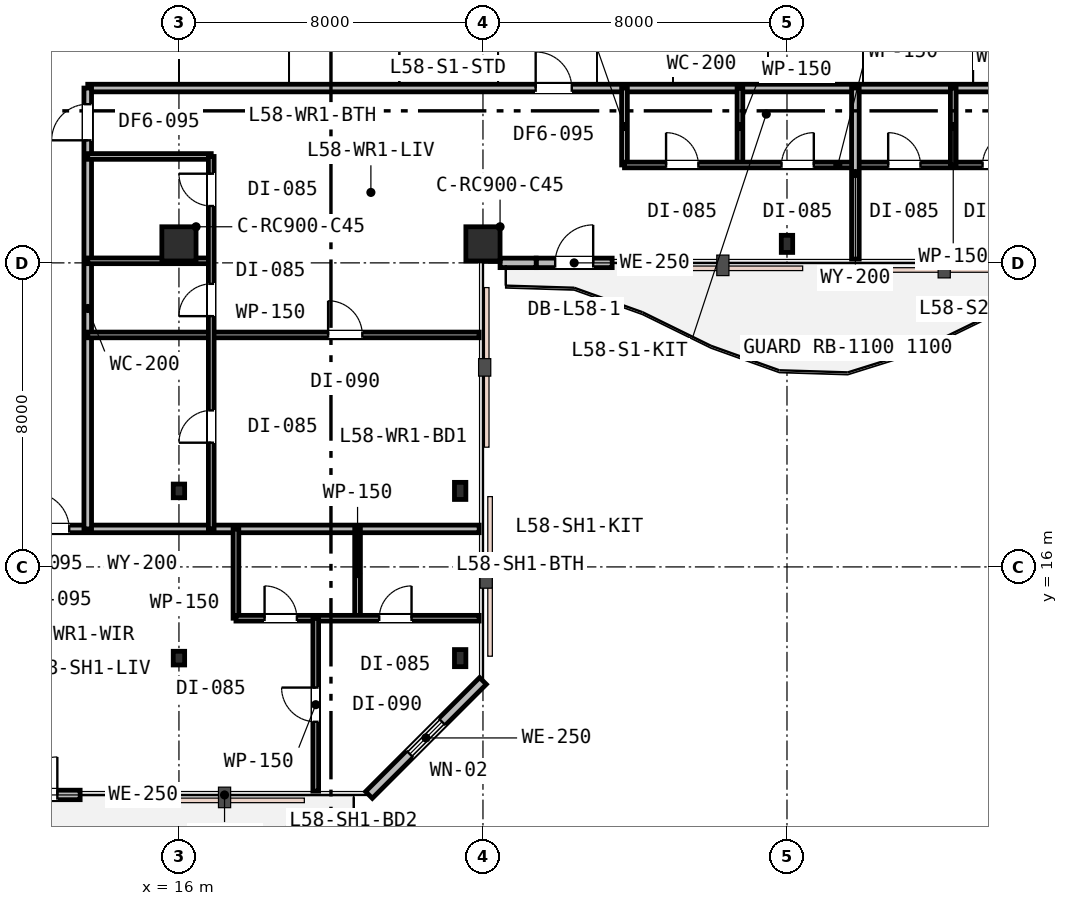
"""IFC4 building model, lengths in metres.
Left out: names, types, materials, properties, quantities, classifications, styles, units other than length and angle.
Written with IfcOpenShell. Run it as: python <this file> out.ifc"""

import sys

from ifc_helpers import new_model, si_unit, direction, frame, frame_2d, origin, origin_2d, place, context, subcontext, project, spatial, rectangle, i_section, extrude, element, fill, save


model = new_model("IFC4")
c1 = context("Model", 3, precision=1e-05, world=origin(), true_north=direction((0.0, 1.0)))
c2 = subcontext(c1, "Body", "Model", "MODEL_VIEW")
j1 = project(units=[si_unit("LENGTHUNIT", "METRE"), si_unit("PLANEANGLEUNIT", "RADIAN")], contexts=[c1])
p1 = place(None, origin())
s1 = spatial("IfcSite", under=j1, at=p1, CompositionType="ELEMENT")
p2 = place(p1, origin())
s2 = spatial("IfcBuilding", under=s1, at=p2, CompositionType="ELEMENT")
p3 = place(p2, frame((0.0, 0.0, 226.0)))
s3 = spatial("IfcBuildingStorey", under=s2, at=p3, CompositionType="ELEMENT", Elevation=226.0)
for number, where, z_axis, x_axis in (
    (1, (16.0, 24.5, 0.0), (0.0, 0.0, 1.0), (1.0, 0.0, 0.0)),
    (2, (24.0, 24.5, 0.0), (0.0, 0.0, 1.0), (1.0, 0.0, 0.0)),
):
    element("IfcColumn", number, at=place(p3, frame(where, z_axis=z_axis, x_axis=x_axis)), inside=s3, PredefinedType="COLUMN", context=c2, shape_type="SweptSolid", body=[
        extrude(rectangle(XDim=0.9, YDim=0.9, at=origin_2d()), origin(), (0.0, 0.0, 1.0), 3.8),
    ])
for number, where, z_axis, x_axis in (
    (3, (32.0, 24.5, 0.0), (0.0, 0.0, 1.0), (1.0, 0.0, 0.0)),
    (4, (23.4, 13.6, 0.0), (0.0, 0.0, 1.0), (1.0, 0.0, 0.0)),
    (5, (23.4, 18.0, 0.0), (0.0, 0.0, 1.0), (1.0, 0.0, 0.0)),
):
    element("IfcColumn", number, at=place(p3, frame(where, z_axis=z_axis, x_axis=x_axis)), inside=s3, PredefinedType="COLUMN", context=c2, shape_type="SweptSolid", body=[
        extrude(i_section(OverallWidth=0.3, OverallDepth=0.45, WebThickness=0.014, FlangeThickness=0.026, FilletRadius=0.027, at=origin_2d()), origin(), (0.0, 0.0, 1.0), 3.8),
    ])
for number, where, z_axis, x_axis in (
    (6, (16.0, 13.6, 0.0), (0.0, 0.0, 1.0), (1.0, 0.0, 0.0)),
    (7, (16.0, 18.0, 0.0), (0.0, 0.0, 1.0), (1.0, 0.0, 0.0)),
):
    element("IfcColumn", number, at=place(p3, frame(where, z_axis=z_axis, x_axis=x_axis)), inside=s3, PredefinedType="COLUMN", context=c2, shape_type="SweptSolid", body=[
        extrude(i_section(OverallWidth=0.3, OverallDepth=0.36, WebThickness=0.013, FlangeThickness=0.022, FilletRadius=0.027, at=origin_2d()), origin(), (0.0, 0.0, 1.0), 3.8),
    ])
p4 = place(p3, frame((11.2, 10.0, 0.0), z_axis=(0.0, 0.0, 1.0), x_axis=(1.0, 0.0, 0.0)))
e8 = element("IfcWall", 8, at=p4, inside=s3, PredefinedType="STANDARD", context=c2, shape_type="SweptSolid", body=[
    extrude(rectangle(XDim=2.2, YDim=0.25, at=frame_2d((1.1, 0.0))), origin(), (0.0, 0.0, 1.0), 3.53),
])
p5 = place(p4, frame((0.6, 0.0, 0.0)))
e9 = element("IfcOpeningElement", 9, at=p5, cuts=e8, PredefinedType="OPENING", context=c2, shape_type="SweptSolid", body=[
    extrude(rectangle(XDim=1.0, YDim=2.15, at=frame_2d((0.5, 1.075))), frame((0.0, 0.135, 0.0), z_axis=(0.0, -1.0, 0.0), x_axis=(1.0, 0.0, 0.0)), (0.0, 0.0, 1.0), 0.27),
])
p6 = place(p3, frame((21.0, 10.0, 0.0), z_axis=(0.0, 0.0, 1.0), x_axis=(0.707106781187, 0.707106781187, 0.0)))
e10 = element("IfcWall", 10, at=p6, inside=s3, PredefinedType="STANDARD", context=c2, shape_type="SweptSolid", body=[
    extrude(rectangle(XDim=4.243, YDim=0.25, at=frame_2d((2.121, 0.0))), origin(), (0.0, 0.0, 1.0), 3.53),
])
p7 = place(p6, frame((1.521, 0.0, 0.85)))
e11 = element("IfcOpeningElement", 11, at=p7, cuts=e10, PredefinedType="OPENING", context=c2, shape_type="SweptSolid", body=[
    extrude(rectangle(XDim=1.2, YDim=1.6, at=frame_2d((0.6, 0.8))), frame((0.0, 0.135, 0.0), z_axis=(0.0, -1.0, 0.0), x_axis=(1.0, 0.0, 0.0)), (0.0, 0.0, 1.0), 0.27),
])
p8 = place(p3, frame((25.4, 24.0, 0.0), z_axis=(0.0, 0.0, 1.0), x_axis=(1.0, 0.0, 0.0)))
e12 = element("IfcWall", 12, at=p8, inside=s3, PredefinedType="STANDARD", context=c2, shape_type="SweptSolid", body=[
    extrude(rectangle(XDim=2.0, YDim=0.25, at=frame_2d((1.0, 0.0))), origin(), (0.0, 0.0, 1.0), 3.24),
])
p9 = place(p8, frame((0.5, 0.0, 0.0)))
e13 = element("IfcOpeningElement", 13, at=p9, cuts=e12, PredefinedType="OPENING", context=c2, shape_type="SweptSolid", body=[
    extrude(rectangle(XDim=1.0, YDim=2.15, at=frame_2d((0.5, 1.075))), frame((0.0, 0.135, 0.0), z_axis=(0.0, -1.0, 0.0), x_axis=(1.0, 0.0, 0.0)), (0.0, 0.0, 1.0), 0.27),
])
p10 = place(p3, frame((24.45, 24.0, 0.0), z_axis=(0.0, 0.0, 1.0), x_axis=(1.0, 0.0, 0.0)))
e14 = element("IfcWall", 14, at=p10, inside=s3, PredefinedType="STANDARD", context=c2, shape_type="SweptSolid", body=[
    extrude(rectangle(XDim=0.95, YDim=0.25, at=frame_2d((0.475, 0.0))), origin(), (0.0, 0.0, 1.0), 3.24),
])
p11 = place(p3, frame((13.6, 28.6, 0.0), z_axis=(0.0, 0.0, 1.0), x_axis=(1.0, 0.0, 0.0)))
e15 = element("IfcWall", 15, at=p11, inside=s3, PredefinedType="PARTITIONING", context=c2, shape_type="SweptSolid", body=[
    extrude(rectangle(XDim=32.3, YDim=0.2, at=frame_2d((16.15, 0.0))), origin(), (0.0, 0.0, 1.0), 2.92),
])
p12 = place(p11, frame((11.787, 0.0, 0.0)))
e16 = element("IfcOpeningElement", 16, at=p12, cuts=e15, PredefinedType="OPENING", context=c2, shape_type="SweptSolid", body=[
    extrude(rectangle(XDim=0.95, YDim=2.15, at=frame_2d((0.475, 1.075))), frame((0.0, 0.11, 0.0), z_axis=(0.0, -1.0, 0.0), x_axis=(1.0, 0.0, 0.0)), (0.0, 0.0, 1.0), 0.22),
])
p13 = place(p11, frame((25.8, 0.0, 0.0)))
e17 = element("IfcOpeningElement", 17, at=p13, cuts=e15, PredefinedType="OPENING", context=c2, shape_type="SweptSolid", body=[
    extrude(rectangle(XDim=0.95, YDim=2.15, at=frame_2d((0.475, 1.075))), frame((0.0, 0.11, 0.0), z_axis=(0.0, -1.0, 0.0), x_axis=(1.0, 0.0, 0.0)), (0.0, 0.0, 1.0), 0.22),
])
for number, where, z_axis, x_axis in (
    (18, (27.724, 26.576, 0.0), (0.0, 0.0, 1.0), (0.0, 1.0, 0.0)),
    (19, (30.762, 26.576, 0.0), (0.0, 0.0, 1.0), (0.0, 1.0, 0.0)),
):
    element("IfcWall", number, at=place(p3, frame(where, z_axis=z_axis, x_axis=x_axis)), inside=s3, PredefinedType="PARTITIONING", context=c2, shape_type="SweptSolid", body=[
        extrude(rectangle(XDim=2.024, YDim=0.15, at=frame_2d((1.012, 0.0))), origin(), (0.0, 0.0, 1.0), 3.53),
    ])
p14 = place(p3, frame((27.724, 26.576, 0.0), z_axis=(0.0, 0.0, 1.0), x_axis=(1.0, 0.0, 0.0)))
e20 = element("IfcWall", 20, at=p14, inside=s3, PredefinedType="PARTITIONING", context=c2, shape_type="SweptSolid", body=[
    extrude(rectangle(XDim=11.226, YDim=0.15, at=frame_2d((5.613, 0.0))), origin(), (0.0, 0.0, 1.0), 2.92),
])
p15 = place(p14, frame((1.094, 0.0, 0.0)))
e21 = element("IfcOpeningElement", 21, at=p15, cuts=e20, PredefinedType="OPENING", context=c2, shape_type="SweptSolid", body=[
    extrude(rectangle(XDim=0.85, YDim=2.15, at=frame_2d((0.425, 1.075))), frame((0.0, 0.085, 0.0), z_axis=(0.0, -1.0, 0.0), x_axis=(1.0, 0.0, 0.0)), (0.0, 0.0, 1.0), 0.17),
])
p16 = place(p14, frame((4.132, 0.0, 0.0)))
e22 = element("IfcOpeningElement", 22, at=p16, cuts=e20, PredefinedType="OPENING", context=c2, shape_type="SweptSolid", body=[
    extrude(rectangle(XDim=0.85, YDim=2.15, at=frame_2d((0.425, 1.075))), frame((0.0, 0.085, 0.0), z_axis=(0.0, -1.0, 0.0), x_axis=(1.0, 0.0, 0.0)), (0.0, 0.0, 1.0), 0.17),
])
p17 = place(p14, frame((6.939, 0.0, 0.0)))
e23 = element("IfcOpeningElement", 23, at=p17, cuts=e20, PredefinedType="OPENING", context=c2, shape_type="SweptSolid", body=[
    extrude(rectangle(XDim=0.85, YDim=2.15, at=frame_2d((0.425, 1.075))), frame((0.0, 0.085, 0.0), z_axis=(0.0, -1.0, 0.0), x_axis=(1.0, 0.0, 0.0)), (0.0, 0.0, 1.0), 0.17),
])
p18 = place(p14, frame((9.422, 0.0, 0.0)))
e24 = element("IfcOpeningElement", 24, at=p18, cuts=e20, PredefinedType="OPENING", context=c2, shape_type="SweptSolid", body=[
    extrude(rectangle(XDim=0.85, YDim=2.15, at=frame_2d((0.425, 1.075))), frame((0.0, 0.085, 0.0), z_axis=(0.0, -1.0, 0.0), x_axis=(1.0, 0.0, 0.0)), (0.0, 0.0, 1.0), 0.17),
])
p19 = place(p3, frame((33.8, 24.1, 0.0), z_axis=(0.0, 0.0, 1.0), x_axis=(0.0, 1.0, 0.0)))
e25 = element("IfcWall", 25, at=p19, inside=s3, PredefinedType="PARTITIONING", context=c2, shape_type="SweptSolid", body=[
    extrude(rectangle(XDim=4.5, YDim=0.2, at=frame_2d((2.25, 0.0))), origin(), (0.0, 0.0, 1.0), 3.24),
])
p20 = place(p3, frame((36.375, 26.576, 0.0), z_axis=(0.0, 0.0, 1.0), x_axis=(0.0, 1.0, 0.0)))
e26 = element("IfcWall", 26, at=p20, inside=s3, PredefinedType="PARTITIONING", context=c2, shape_type="SweptSolid", body=[
    extrude(rectangle(XDim=2.024, YDim=0.15, at=frame_2d((1.012, 0.0))), origin(), (0.0, 0.0, 1.0), 3.53),
])
p21 = place(p3, frame((5.1, 17.0, 0.0), z_axis=(0.0, 0.0, 1.0), x_axis=(1.0, 0.0, 0.0)))
e27 = element("IfcWall", 27, at=p21, inside=s3, PredefinedType="PARTITIONING", context=c2, shape_type="SweptSolid", body=[
    extrude(rectangle(XDim=18.8, YDim=0.2, at=frame_2d((9.4, 0.0))), origin(), (0.0, 0.0, 1.0), 2.92),
])
p22 = place(p21, frame((7.063, 0.0, 0.0)))
e28 = element("IfcOpeningElement", 28, at=p22, cuts=e27, PredefinedType="OPENING", context=c2, shape_type="SweptSolid", body=[
    extrude(rectangle(XDim=0.95, YDim=2.15, at=frame_2d((0.475, 1.075))), frame((0.0, 0.11, 0.0), z_axis=(0.0, -1.0, 0.0), x_axis=(1.0, 0.0, 0.0)), (0.0, 0.0, 1.0), 0.22),
])
p23 = place(p3, frame((13.6, 17.0, 0.0), z_axis=(0.0, 0.0, 1.0), x_axis=(0.0, 1.0, 0.0)))
e29 = element("IfcWall", 29, at=p23, inside=s3, PredefinedType="PARTITIONING", context=c2, shape_type="SweptSolid", body=[
    extrude(rectangle(XDim=11.6, YDim=0.2, at=frame_2d((5.8, 0.0))), origin(), (0.0, 0.0, 1.0), 2.92),
])
p24 = place(p23, frame((10.225, 0.0, 0.0)))
e30 = element("IfcOpeningElement", 30, at=p24, cuts=e29, PredefinedType="OPENING", context=c2, shape_type="SweptSolid", body=[
    extrude(rectangle(XDim=0.95, YDim=2.15, at=frame_2d((0.475, 1.075))), frame((0.0, 0.11, 0.0), z_axis=(0.0, -1.0, 0.0), x_axis=(1.0, 0.0, 0.0)), (0.0, 0.0, 1.0), 0.22),
])
p25 = place(p3, frame((13.6, 22.104, 0.0), z_axis=(0.0, 0.0, 1.0), x_axis=(1.0, 0.0, 0.0)))
e31 = element("IfcWall", 31, at=p25, inside=s3, PredefinedType="PARTITIONING", context=c2, shape_type="SweptSolid", body=[
    extrude(rectangle(XDim=10.3, YDim=0.15, at=frame_2d((5.15, 0.0))), origin(), (0.0, 0.0, 1.0), 2.92),
])
p26 = place(p25, frame((6.325, 0.0, 0.0)))
e32 = element("IfcOpeningElement", 32, at=p26, cuts=e31, PredefinedType="OPENING", context=c2, shape_type="SweptSolid", body=[
    extrude(rectangle(XDim=0.9, YDim=2.15, at=frame_2d((0.45, 1.075))), frame((0.0, 0.085, 0.0), z_axis=(0.0, -1.0, 0.0), x_axis=(1.0, 0.0, 0.0)), (0.0, 0.0, 1.0), 0.17),
])
for number, where, z_axis, x_axis in (
    (33, (13.6, 24.054, 0.0), (0.0, 0.0, 1.0), (1.0, 0.0, 0.0)),
    (34, (13.6, 26.8, 0.0), (0.0, 0.0, 1.0), (1.0, 0.0, 0.0)),
):
    element("IfcWall", number, at=place(p3, frame(where, z_axis=z_axis, x_axis=x_axis)), inside=s3, PredefinedType="PARTITIONING", context=c2, shape_type="SweptSolid", body=[
        extrude(rectangle(XDim=3.25, YDim=0.15, at=frame_2d((1.625, 0.0))), origin(), (0.0, 0.0, 1.0), 2.92),
    ])
p27 = place(p3, frame((16.85, 17.0, 0.0), z_axis=(0.0, 0.0, 1.0), x_axis=(0.0, 1.0, 0.0)))
e35 = element("IfcWall", 35, at=p27, inside=s3, PredefinedType="PARTITIONING", context=c2, shape_type="SweptSolid", body=[
    extrude(rectangle(XDim=9.8, YDim=0.15, at=frame_2d((4.9, 0.0))), origin(), (0.0, 0.0, 1.0), 2.92),
])
p28 = place(p27, frame((5.598, 0.0, 0.0)))
e36 = element("IfcOpeningElement", 36, at=p28, cuts=e35, PredefinedType="OPENING", context=c2, shape_type="SweptSolid", body=[
    extrude(rectangle(XDim=0.85, YDim=2.15, at=frame_2d((0.425, 1.075))), frame((0.0, 0.085, 0.0), z_axis=(0.0, -1.0, 0.0), x_axis=(1.0, 0.0, 0.0)), (0.0, 0.0, 1.0), 0.17),
])
p29 = place(p27, frame((8.496, 0.0, 0.0)))
e37 = element("IfcOpeningElement", 37, at=p29, cuts=e35, PredefinedType="OPENING", context=c2, shape_type="SweptSolid", body=[
    extrude(rectangle(XDim=0.85, YDim=2.15, at=frame_2d((0.425, 1.075))), frame((0.0, 0.085, 0.0), z_axis=(0.0, -1.0, 0.0), x_axis=(1.0, 0.0, 0.0)), (0.0, 0.0, 1.0), 0.17),
])
p30 = place(p27, frame((2.268, 0.0, 0.0)))
e38 = element("IfcOpeningElement", 38, at=p30, cuts=e35, PredefinedType="OPENING", context=c2, shape_type="SweptSolid", body=[
    extrude(rectangle(XDim=0.85, YDim=2.15, at=frame_2d((0.425, 1.075))), frame((0.0, 0.085, 0.0), z_axis=(0.0, -1.0, 0.0), x_axis=(1.0, 0.0, 0.0)), (0.0, 0.0, 1.0), 0.17),
])
p31 = place(p3, frame((17.5, 14.65, 0.0), z_axis=(0.0, 0.0, 1.0), x_axis=(0.0, 1.0, 0.0)))
e39 = element("IfcWall", 39, at=p31, inside=s3, PredefinedType="PARTITIONING", context=c2, shape_type="SweptSolid", body=[
    extrude(rectangle(XDim=2.35, YDim=0.15, at=frame_2d((1.175, 0.0))), origin(), (0.0, 0.0, 1.0), 3.53),
])
p32 = place(p3, frame((20.7, 14.65, 0.0), z_axis=(0.0, 0.0, 1.0), x_axis=(0.0, 1.0, 0.0)))
e40 = element("IfcWall", 40, at=p32, inside=s3, PredefinedType="PARTITIONING", context=c2, shape_type="SweptSolid", body=[
    extrude(rectangle(XDim=2.35, YDim=0.15, at=frame_2d((1.175, 0.0))), origin(), (0.0, 0.0, 1.0), 3.22),
])
p33 = place(p3, frame((17.5, 14.65, 0.0), z_axis=(0.0, 0.0, 1.0), x_axis=(1.0, 0.0, 0.0)))
e41 = element("IfcWall", 41, at=p33, inside=s3, PredefinedType="PARTITIONING", context=c2, shape_type="SweptSolid", body=[
    extrude(rectangle(XDim=6.4, YDim=0.15, at=frame_2d((3.2, 0.0))), origin(), (0.0, 0.0, 1.0), 3.22),
])
p34 = place(p33, frame((0.753, 0.0, 0.0)))
e42 = element("IfcOpeningElement", 42, at=p34, cuts=e41, PredefinedType="OPENING", context=c2, shape_type="SweptSolid", body=[
    extrude(rectangle(XDim=0.85, YDim=2.15, at=frame_2d((0.425, 1.075))), frame((0.0, 0.085, 0.0), z_axis=(0.0, -1.0, 0.0), x_axis=(1.0, 0.0, 0.0)), (0.0, 0.0, 1.0), 0.17),
])
p35 = place(p33, frame((3.771, 0.0, 0.0)))
e43 = element("IfcOpeningElement", 43, at=p35, cuts=e41, PredefinedType="OPENING", context=c2, shape_type="SweptSolid", body=[
    extrude(rectangle(XDim=0.85, YDim=2.15, at=frame_2d((0.425, 1.075))), frame((0.0, 0.085, 0.0), z_axis=(0.0, -1.0, 0.0), x_axis=(1.0, 0.0, 0.0)), (0.0, 0.0, 1.0), 0.17),
])
p36 = place(p3, frame((19.6, 10.1, 0.0), z_axis=(0.0, 0.0, 1.0), x_axis=(0.0, 1.0, 0.0)))
e44 = element("IfcWall", 44, at=p36, inside=s3, PredefinedType="PARTITIONING", context=c2, shape_type="SweptSolid", body=[
    extrude(rectangle(XDim=4.55, YDim=0.15, at=frame_2d((2.275, 0.0))), origin(), (0.0, 0.0, 1.0), 2.92),
])
p37 = place(p36, frame((1.825, 0.0, 0.0)))
e45 = element("IfcOpeningElement", 45, at=p37, cuts=e44, PredefinedType="OPENING", context=c2, shape_type="SweptSolid", body=[
    extrude(rectangle(XDim=0.9, YDim=2.15, at=frame_2d((0.45, 1.075))), frame((0.0, 0.085, 0.0), z_axis=(0.0, -1.0, 0.0), x_axis=(1.0, 0.0, 0.0)), (0.0, 0.0, 1.0), 0.17),
])
p38 = place(p5, origin())
e46 = element("IfcDoor", 46, at=p38, inside=s3, OperationType="SINGLE_SWING_RIGHT", PredefinedType="DOOR", context=c2, shape_type="SweptSolid", body=[
    extrude(rectangle(XDim=1.0, YDim=2.15, at=frame_2d((0.5, 1.075))), frame((0.0, 0.025, 0.0), z_axis=(0.0, -1.0, 0.0), x_axis=(1.0, 0.0, 0.0)), (0.0, 0.0, 1.0), 0.05),
])
fill(e9, e46)
p39 = place(p7, origin())
e47 = element("IfcWindow", 47, at=p39, inside=s3, PartitioningType="SINGLE_PANEL", PredefinedType="WINDOW", context=c2, shape_type="SweptSolid", body=[
    extrude(rectangle(XDim=1.2, YDim=1.6, at=frame_2d((0.6, 0.8))), frame((0.0, 0.03, 0.0), z_axis=(0.0, -1.0, 0.0), x_axis=(1.0, 0.0, 0.0)), (0.0, 0.0, 1.0), 0.06),
])
fill(e11, e47)
p40 = place(p9, origin())
e48 = element("IfcDoor", 48, at=p40, inside=s3, OperationType="SINGLE_SWING_RIGHT", PredefinedType="DOOR", context=c2, shape_type="SweptSolid", body=[
    extrude(rectangle(XDim=1.0, YDim=2.15, at=frame_2d((0.5, 1.075))), frame((0.0, 0.025, 0.0), z_axis=(0.0, -1.0, 0.0), x_axis=(1.0, 0.0, 0.0)), (0.0, 0.0, 1.0), 0.05),
])
fill(e13, e48)
p41 = place(p12, origin())
e49 = element("IfcDoor", 49, at=p41, inside=s3, OperationType="SINGLE_SWING_LEFT", PredefinedType="DOOR", context=c2, shape_type="SweptSolid", body=[
    extrude(rectangle(XDim=0.95, YDim=2.15, at=frame_2d((0.475, 1.075))), frame((0.0, 0.025, 0.0), z_axis=(0.0, -1.0, 0.0), x_axis=(1.0, 0.0, 0.0)), (0.0, 0.0, 1.0), 0.05),
])
fill(e16, e49)
p42 = place(p15, origin())
e50 = element("IfcDoor", 50, at=p42, inside=s3, OperationType="SINGLE_SWING_LEFT", PredefinedType="DOOR", context=c2, shape_type="SweptSolid", body=[
    extrude(rectangle(XDim=0.85, YDim=2.15, at=frame_2d((0.425, 1.075))), frame((0.0, 0.025, 0.0), z_axis=(0.0, -1.0, 0.0), x_axis=(1.0, 0.0, 0.0)), (0.0, 0.0, 1.0), 0.05),
])
fill(e21, e50)
p43 = place(p16, origin())
e51 = element("IfcDoor", 51, at=p43, inside=s3, OperationType="SINGLE_SWING_RIGHT", PredefinedType="DOOR", context=c2, shape_type="SweptSolid", body=[
    extrude(rectangle(XDim=0.85, YDim=2.15, at=frame_2d((0.425, 1.075))), frame((0.0, 0.025, 0.0), z_axis=(0.0, -1.0, 0.0), x_axis=(1.0, 0.0, 0.0)), (0.0, 0.0, 1.0), 0.05),
])
fill(e22, e51)
p44 = place(p17, origin())
e52 = element("IfcDoor", 52, at=p44, inside=s3, OperationType="SINGLE_SWING_LEFT", PredefinedType="DOOR", context=c2, shape_type="SweptSolid", body=[
    extrude(rectangle(XDim=0.85, YDim=2.15, at=frame_2d((0.425, 1.075))), frame((0.0, 0.025, 0.0), z_axis=(0.0, -1.0, 0.0), x_axis=(1.0, 0.0, 0.0)), (0.0, 0.0, 1.0), 0.05),
])
fill(e23, e52)
p45 = place(p18, origin())
e53 = element("IfcDoor", 53, at=p45, inside=s3, OperationType="SINGLE_SWING_RIGHT", PredefinedType="DOOR", context=c2, shape_type="SweptSolid", body=[
    extrude(rectangle(XDim=0.85, YDim=2.15, at=frame_2d((0.425, 1.075))), frame((0.0, 0.025, 0.0), z_axis=(0.0, -1.0, 0.0), x_axis=(1.0, 0.0, 0.0)), (0.0, 0.0, 1.0), 0.05),
])
fill(e24, e53)
p46 = place(p24, origin())
e54 = element("IfcDoor", 54, at=p46, inside=s3, OperationType="SINGLE_SWING_LEFT", PredefinedType="DOOR", context=c2, shape_type="SweptSolid", body=[
    extrude(rectangle(XDim=0.95, YDim=2.15, at=frame_2d((0.475, 1.075))), frame((0.0, 0.025, 0.0), z_axis=(0.0, -1.0, 0.0), x_axis=(1.0, 0.0, 0.0)), (0.0, 0.0, 1.0), 0.05),
])
fill(e30, e54)
p47 = place(p28, origin())
e55 = element("IfcDoor", 55, at=p47, inside=s3, OperationType="SINGLE_SWING_LEFT", PredefinedType="DOOR", context=c2, shape_type="SweptSolid", body=[
    extrude(rectangle(XDim=0.85, YDim=2.15, at=frame_2d((0.425, 1.075))), frame((0.0, 0.025, 0.0), z_axis=(0.0, -1.0, 0.0), x_axis=(1.0, 0.0, 0.0)), (0.0, 0.0, 1.0), 0.05),
])
fill(e36, e55)
p48 = place(p29, origin())
e56 = element("IfcDoor", 56, at=p48, inside=s3, OperationType="SINGLE_SWING_RIGHT", PredefinedType="DOOR", context=c2, shape_type="SweptSolid", body=[
    extrude(rectangle(XDim=0.85, YDim=2.15, at=frame_2d((0.425, 1.075))), frame((0.0, 0.025, 0.0), z_axis=(0.0, -1.0, 0.0), x_axis=(1.0, 0.0, 0.0)), (0.0, 0.0, 1.0), 0.05),
])
fill(e37, e56)
p49 = place(p30, origin())
e57 = element("IfcDoor", 57, at=p49, inside=s3, OperationType="SINGLE_SWING_LEFT", PredefinedType="DOOR", context=c2, shape_type="SweptSolid", body=[
    extrude(rectangle(XDim=0.85, YDim=2.15, at=frame_2d((0.425, 1.075))), frame((0.0, 0.025, 0.0), z_axis=(0.0, -1.0, 0.0), x_axis=(1.0, 0.0, 0.0)), (0.0, 0.0, 1.0), 0.05),
])
fill(e38, e57)
p50 = place(p26, origin())
e58 = element("IfcDoor", 58, at=p50, inside=s3, OperationType="SINGLE_SWING_LEFT", PredefinedType="DOOR", context=c2, shape_type="SweptSolid", body=[
    extrude(rectangle(XDim=0.9, YDim=2.15, at=frame_2d((0.45, 1.075))), frame((0.0, 0.025, 0.0), z_axis=(0.0, -1.0, 0.0), x_axis=(1.0, 0.0, 0.0)), (0.0, 0.0, 1.0), 0.05),
])
fill(e32, e58)
p51 = place(p22, origin())
e59 = element("IfcDoor", 59, at=p51, inside=s3, OperationType="SINGLE_SWING_LEFT", PredefinedType="DOOR", context=c2, shape_type="SweptSolid", body=[
    extrude(rectangle(XDim=0.95, YDim=2.15, at=frame_2d((0.475, 1.075))), frame((0.0, 0.025, 0.0), z_axis=(0.0, -1.0, 0.0), x_axis=(1.0, 0.0, 0.0)), (0.0, 0.0, 1.0), 0.05),
])
fill(e28, e59)
p52 = place(p34, origin())
e60 = element("IfcDoor", 60, at=p52, inside=s3, OperationType="SINGLE_SWING_LEFT", PredefinedType="DOOR", context=c2, shape_type="SweptSolid", body=[
    extrude(rectangle(XDim=0.85, YDim=2.15, at=frame_2d((0.425, 1.075))), frame((0.0, 0.025, 0.0), z_axis=(0.0, -1.0, 0.0), x_axis=(1.0, 0.0, 0.0)), (0.0, 0.0, 1.0), 0.05),
])
fill(e42, e60)
p53 = place(p35, origin())
e61 = element("IfcDoor", 61, at=p53, inside=s3, OperationType="SINGLE_SWING_RIGHT", PredefinedType="DOOR", context=c2, shape_type="SweptSolid", body=[
    extrude(rectangle(XDim=0.85, YDim=2.15, at=frame_2d((0.425, 1.075))), frame((0.0, 0.025, 0.0), z_axis=(0.0, -1.0, 0.0), x_axis=(1.0, 0.0, 0.0)), (0.0, 0.0, 1.0), 0.05),
])
fill(e43, e61)
p54 = place(p37, origin())
e62 = element("IfcDoor", 62, at=p54, inside=s3, OperationType="SINGLE_SWING_RIGHT", PredefinedType="DOOR", context=c2, shape_type="SweptSolid", body=[
    extrude(rectangle(XDim=0.9, YDim=2.15, at=frame_2d((0.45, 1.075))), frame((0.0, 0.025, 0.0), z_axis=(0.0, -1.0, 0.0), x_axis=(1.0, 0.0, 0.0)), (0.0, 0.0, 1.0), 0.05),
])
fill(e45, e62)
save(model, sys.argv[1])
